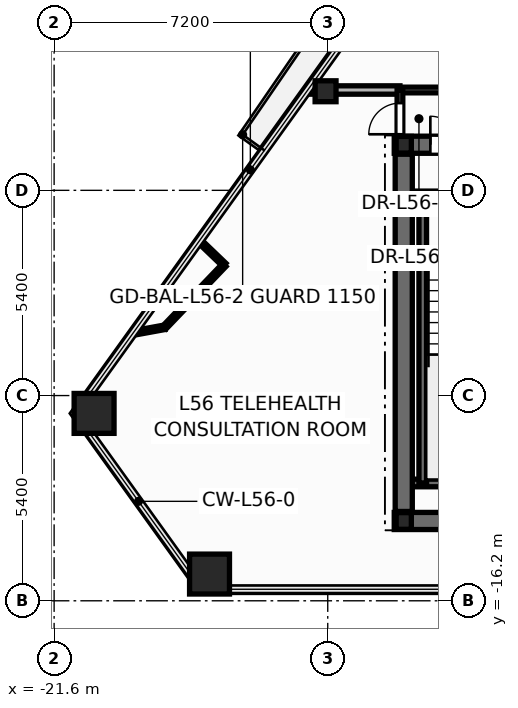
"""IFC4 building model, lengths in metres.
Left out: names, types, materials, properties, quantities, classifications, styles, units other than length and angle.
Written with IfcOpenShell. Run it as: python <this file> out.ifc"""

import sys

from ifc_helpers import new_model, si_unit, direction, frame, frame_2d, origin, origin_2d, place, context, subcontext, project, spatial, rectangle, hollow_rectangle, hollow_circle, i_section, extrude, element, fill, save


model = new_model("IFC4")
c1 = context("Model", 3, precision=1e-05, world=origin(), true_north=direction((0.0, 1.0)))
c2 = subcontext(c1, "Body", "Model", "MODEL_VIEW")
j1 = project(units=[si_unit("LENGTHUNIT", "METRE"), si_unit("PLANEANGLEUNIT", "RADIAN")], contexts=[c1])
p1 = place(None, origin())
s1 = spatial("IfcSite", under=j1, at=p1, CompositionType="ELEMENT")
p2 = place(p1, origin())
s2 = spatial("IfcBuilding", under=s1, at=p2, CompositionType="ELEMENT")
p3 = place(p2, frame((0.0, 0.0, 214.5)))
s3 = spatial("IfcBuildingStorey", under=s2, at=p3, CompositionType="ELEMENT", Elevation=214.5)
for number, where, z_axis, x_axis in (
    (1, (-20.548, -11.27, 0.0), (0.0, 0.0, 1.0), (1.0, 0.0, 0.0)),
    (2, (-17.511, -15.497, 0.0), (0.0, 0.0, 1.0), (1.0, 0.0, 0.0)),
):
    element("IfcColumn", number, at=place(p3, frame(where, z_axis=z_axis, x_axis=x_axis)), inside=s3, PredefinedType="COLUMN", context=c2, shape_type="SweptSolid", body=[
        extrude(hollow_rectangle(XDim=1.05, YDim=1.05, WallThickness=0.045, at=origin_2d()), origin(), (0.0, 0.0, 1.0), 3.6),
    ])
p4 = place(p3, frame((-14.457, -2.793, 0.0), z_axis=(0.0, 0.0, 1.0), x_axis=(1.0, 0.0, 0.0)))
e3 = element("IfcColumn", 3, at=p4, inside=s3, PredefinedType="COLUMN", context=c2, shape_type="SweptSolid", body=[
    extrude(hollow_circle(Radius=0.275, WallThickness=0.024, at=origin_2d()), origin(), (0.0, 0.0, 1.0), 3.6),
])
for number, where, z_axis, x_axis in (
    (4, (-12.4, -14.1, 0.0), (0.0, 0.0, 1.0), (1.0, 0.0, 0.0)),
    (5, (-12.4, -4.2, 0.0), (0.0, 0.0, 1.0), (1.0, 0.0, 0.0)),
):
    element("IfcColumn", number, at=place(p3, frame(where, z_axis=z_axis, x_axis=x_axis)), inside=s3, PredefinedType="COLUMN", context=c2, shape_type="SweptSolid", body=[
        extrude(i_section(OverallWidth=0.4, OverallDepth=0.44, WebThickness=0.028, FlangeThickness=0.04, at=origin_2d()), origin(), (0.0, 0.0, 1.0), 3.6),
    ])
p5 = place(p3, frame((-12.65, -14.1, 0.0), z_axis=(0.0, 0.0, 1.0), x_axis=(1.0, 0.0, 0.0)))
e6 = element("IfcWall", 6, at=p5, inside=s3, PredefinedType="SHEAR", context=c2, shape_type="SweptSolid", body=[
    extrude(rectangle(XDim=25.3, YDim=0.45, at=frame_2d((12.65, 0.0))), origin(), (0.0, 0.0, 1.0), 3.6),
])
p6 = place(p3, frame((-12.65, -4.2, 0.0), z_axis=(0.0, 0.0, 1.0), x_axis=(1.0, 0.0, 0.0)))
e7 = element("IfcWall", 7, at=p6, inside=s3, PredefinedType="SHEAR", context=c2, shape_type="SweptSolid", body=[
    extrude(rectangle(XDim=25.3, YDim=0.45, at=frame_2d((12.65, 0.0))), origin(), (0.0, 0.0, 1.0), 3.6),
])
p7 = place(p6, frame((0.95, 0.0, 0.0)))
e8 = element("IfcOpeningElement", 8, at=p7, cuts=e7, PredefinedType="OPENING", context=c2, shape_type="SweptSolid", body=[
    extrude(rectangle(XDim=0.756, YDim=2.054, at=frame_2d((0.375, 1.027))), frame((0.0, 0.235, 0.0), z_axis=(0.0, -1.0, 0.0), x_axis=(1.0, 0.0, 0.0)), (0.0, 0.0, 1.0), 0.47),
])
p8 = place(p6, frame((2.6, 0.0, 0.0)))
e9 = element("IfcOpeningElement", 9, at=p8, cuts=e7, PredefinedType="OPENING", context=c2, shape_type="SweptSolid", body=[
    extrude(rectangle(XDim=0.756, YDim=2.054, at=frame_2d((0.375, 1.027))), frame((0.0, 0.235, 0.0), z_axis=(0.0, -1.0, 0.0), x_axis=(1.0, 0.0, 0.0)), (0.0, 0.0, 1.0), 0.47),
])
p9 = place(p6, frame((21.85, 0.0, 0.0)))
e10 = element("IfcOpeningElement", 10, at=p9, cuts=e7, PredefinedType="OPENING", context=c2, shape_type="SweptSolid", body=[
    extrude(rectangle(XDim=0.756, YDim=2.054, at=frame_2d((0.375, 1.027))), frame((0.0, 0.235, 0.0), z_axis=(0.0, -1.0, 0.0), x_axis=(1.0, 0.0, 0.0)), (0.0, 0.0, 1.0), 0.47),
])
p10 = place(p6, frame((23.5, 0.0, 0.0)))
e11 = element("IfcOpeningElement", 11, at=p10, cuts=e7, PredefinedType="OPENING", context=c2, shape_type="SweptSolid", body=[
    extrude(rectangle(XDim=0.756, YDim=2.054, at=frame_2d((0.375, 1.027))), frame((0.0, 0.235, 0.0), z_axis=(0.0, -1.0, 0.0), x_axis=(1.0, 0.0, 0.0)), (0.0, 0.0, 1.0), 0.47),
])
p11 = place(p6, frame((5.85, 0.0, 0.0)))
e12 = element("IfcOpeningElement", 12, at=p11, cuts=e7, PredefinedType="OPENING", context=c2, shape_type="SweptSolid", body=[
    extrude(rectangle(XDim=1.006, YDim=2.104, at=frame_2d((0.5, 1.052))), frame((0.0, 0.235, 0.0), z_axis=(0.0, -1.0, 0.0), x_axis=(1.0, 0.0, 0.0)), (0.0, 0.0, 1.0), 0.47),
])
p12 = place(p6, frame((10.35, 0.0, 0.0)))
e13 = element("IfcOpeningElement", 13, at=p12, cuts=e7, PredefinedType="OPENING", context=c2, shape_type="SweptSolid", body=[
    extrude(rectangle(XDim=1.406, YDim=2.154, at=frame_2d((0.7, 1.077))), frame((0.0, 0.235, 0.0), z_axis=(0.0, -1.0, 0.0), x_axis=(1.0, 0.0, 0.0)), (0.0, 0.0, 1.0), 0.47),
])
p13 = place(p6, frame((18.45, 0.0, 0.0)))
e14 = element("IfcOpeningElement", 14, at=p13, cuts=e7, PredefinedType="OPENING", context=c2, shape_type="SweptSolid", body=[
    extrude(rectangle(XDim=1.006, YDim=2.104, at=frame_2d((0.5, 1.052))), frame((0.0, 0.235, 0.0), z_axis=(0.0, -1.0, 0.0), x_axis=(1.0, 0.0, 0.0)), (0.0, 0.0, 1.0), 0.47),
])
for number, where, z_axis, x_axis in (
    (15, (-12.35, -5.52, 0.0), (0.0, 0.0, 1.0), (1.0, 0.0, 0.0)),
    (16, (-12.35, -13.1, 0.0), (0.0, 0.0, 1.0), (1.0, 0.0, 0.0)),
):
    element("IfcWall", number, at=place(p3, frame(where, z_axis=z_axis, x_axis=x_axis)), inside=s3, PredefinedType="SOLIDWALL", context=c2, shape_type="SweptSolid", body=[
        extrude(rectangle(XDim=3.87, YDim=0.2, at=frame_2d((1.935, 0.0))), origin(), (0.0, 0.0, 1.0), 3.6),
    ])
p14 = place(p3, frame((-11.9, -13.1, 0.0), z_axis=(0.0, 0.0, 1.0), x_axis=(0.0, 1.0, 0.0)))
e17 = element("IfcWall", 17, at=p14, inside=s3, PredefinedType="SOLIDWALL", context=c2, shape_type="SweptSolid", body=[
    extrude(rectangle(XDim=7.58, YDim=0.2, at=frame_2d((3.79, 0.0))), origin(), (0.0, 0.0, 1.0), 3.6),
])
p15 = place(p3, frame((-12.4, -13.85, 0.0), z_axis=(0.0, 0.0, 1.0), x_axis=(0.0, 1.0, 0.0)))
e18 = element("IfcWall", 18, at=p15, inside=s3, PredefinedType="SHEAR", context=c2, shape_type="SweptSolid", body=[
    extrude(rectangle(XDim=9.4, YDim=0.45, at=frame_2d((4.7, 0.0))), origin(), (0.0, 0.0, 1.0), 3.6),
])
p16 = place(p3, frame((-12.5, -2.76, 0.0), z_axis=(0.0, 0.0, 1.0), x_axis=(1.0, 0.0, 0.0)))
e19 = element("IfcWall", 19, at=p16, inside=s3, PredefinedType="PARTITIONING", context=c2, shape_type="SweptSolid", body=[
    extrude(rectangle(XDim=7.16, YDim=0.15, at=frame_2d((3.58, 0.0))), origin(), (0.0, 0.0, 1.0), 2.32),
])
p17 = place(p16, frame((1.672, 0.0, 0.0)))
e20 = element("IfcOpeningElement", 20, at=p17, cuts=e19, PredefinedType="OPENING", context=c2, shape_type="SweptSolid", body=[
    extrude(rectangle(XDim=0.956, YDim=2.104, at=frame_2d((0.475, 1.052))), frame((0.0, 0.085, 0.0), z_axis=(0.0, -1.0, 0.0), x_axis=(1.0, 0.0, 0.0)), (0.0, 0.0, 1.0), 0.17),
])
p18 = place(p3, frame((-14.926, -2.76, 0.0), z_axis=(0.0, 0.0, 1.0), x_axis=(1.0, 0.0, 0.0)))
e21 = element("IfcWall", 21, at=p18, inside=s3, PredefinedType="PARTITIONING", context=c2, shape_type="SweptSolid", body=[
    extrude(rectangle(XDim=2.426, YDim=0.22, at=frame_2d((1.213, 0.0))), origin(), (0.0, 0.0, 1.0), 2.32),
])
p19 = place(p3, frame((-17.12, -7.362, 0.0), z_axis=(0.0, 0.0, 1.0), x_axis=(-0.691975296368, -0.721921179366, 0.0)))
e22 = element("IfcWall", 22, at=p19, inside=s3, PredefinedType="PARTITIONING", context=c2, shape_type="SweptSolid", body=[
    extrude(rectangle(XDim=2.275, YDim=0.12, at=frame_2d((1.137, 0.0))), origin(), (0.0, 0.0, 1.0), 3.345),
])
p20 = place(p3, frame((-12.5, -4.24, 0.0), z_axis=(0.0, 0.0, 1.0), x_axis=(0.0, 1.0, 0.0)))
e23 = element("IfcWall", 23, at=p20, inside=s3, PredefinedType="PARTITIONING", context=c2, shape_type="SweptSolid", body=[
    extrude(rectangle(XDim=1.48, YDim=0.15, at=frame_2d((0.74, 0.0))), origin(), (0.0, 0.0, 1.0), 2.32),
])
p21 = place(p20, frame((0.315, 0.0, 0.0)))
e24 = element("IfcOpeningElement", 24, at=p21, cuts=e23, PredefinedType="OPENING", context=c2, shape_type="SweptSolid", body=[
    extrude(rectangle(XDim=0.826, YDim=2.104, at=frame_2d((0.41, 1.052))), frame((0.0, 0.085, 0.0), z_axis=(0.0, -1.0, 0.0), x_axis=(1.0, 0.0, 0.0)), (0.0, 0.0, 1.0), 0.17),
])
p22 = place(p3, frame((-17.771, -6.737, 0.0), z_axis=(0.0, 0.0, 1.0), x_axis=(0.721695363455, -0.692210807751, 0.0)))
e25 = element("IfcWall", 25, at=p22, inside=s3, PredefinedType="PARTITIONING", context=c2, shape_type="SweptSolid", body=[
    extrude(rectangle(XDim=0.903, YDim=0.12, at=frame_2d((0.451, 0.0))), origin(), (0.0, 0.0, 1.0), 2.787),
])
p23 = place(p3, frame((-18.694, -9.004, 0.0), z_axis=(0.0, 0.0, 1.0), x_axis=(-0.983694613694, -0.179846898751, 0.0)))
e26 = element("IfcWall", 26, at=p23, inside=s3, PredefinedType="PARTITIONING", context=c2, shape_type="SweptSolid", body=[
    extrude(rectangle(XDim=0.827, YDim=0.12, at=frame_2d((0.413, 0.0))), origin(), (0.0, 0.0, 1.0), 2.787),
])
p24 = place(p7, origin())
e27 = element("IfcDoor", 27, at=p24, inside=s3, OperationType="SINGLE_SWING_LEFT", PredefinedType="DOOR", context=c2, shape_type="SweptSolid", body=[
    extrude(rectangle(XDim=0.75, YDim=2.05, at=frame_2d((0.375, 1.025))), frame((0.0, 0.025, 0.0), z_axis=(0.0, -1.0, 0.0), x_axis=(1.0, 0.0, 0.0)), (0.0, 0.0, 1.0), 0.05),
])
fill(e8, e27)
p25 = place(p21, origin())
e28 = element("IfcDoor", 28, at=p25, inside=s3, OperationType="SINGLE_SWING_LEFT", PredefinedType="DOOR", context=c2, shape_type="SweptSolid", body=[
    extrude(rectangle(XDim=0.82, YDim=2.1, at=frame_2d((0.41, 1.05))), frame((0.0, 0.025, 0.0), z_axis=(0.0, -1.0, 0.0), x_axis=(1.0, 0.0, 0.0)), (0.0, 0.0, 1.0), 0.05),
])
fill(e24, e28)
save(model, sys.argv[1])
